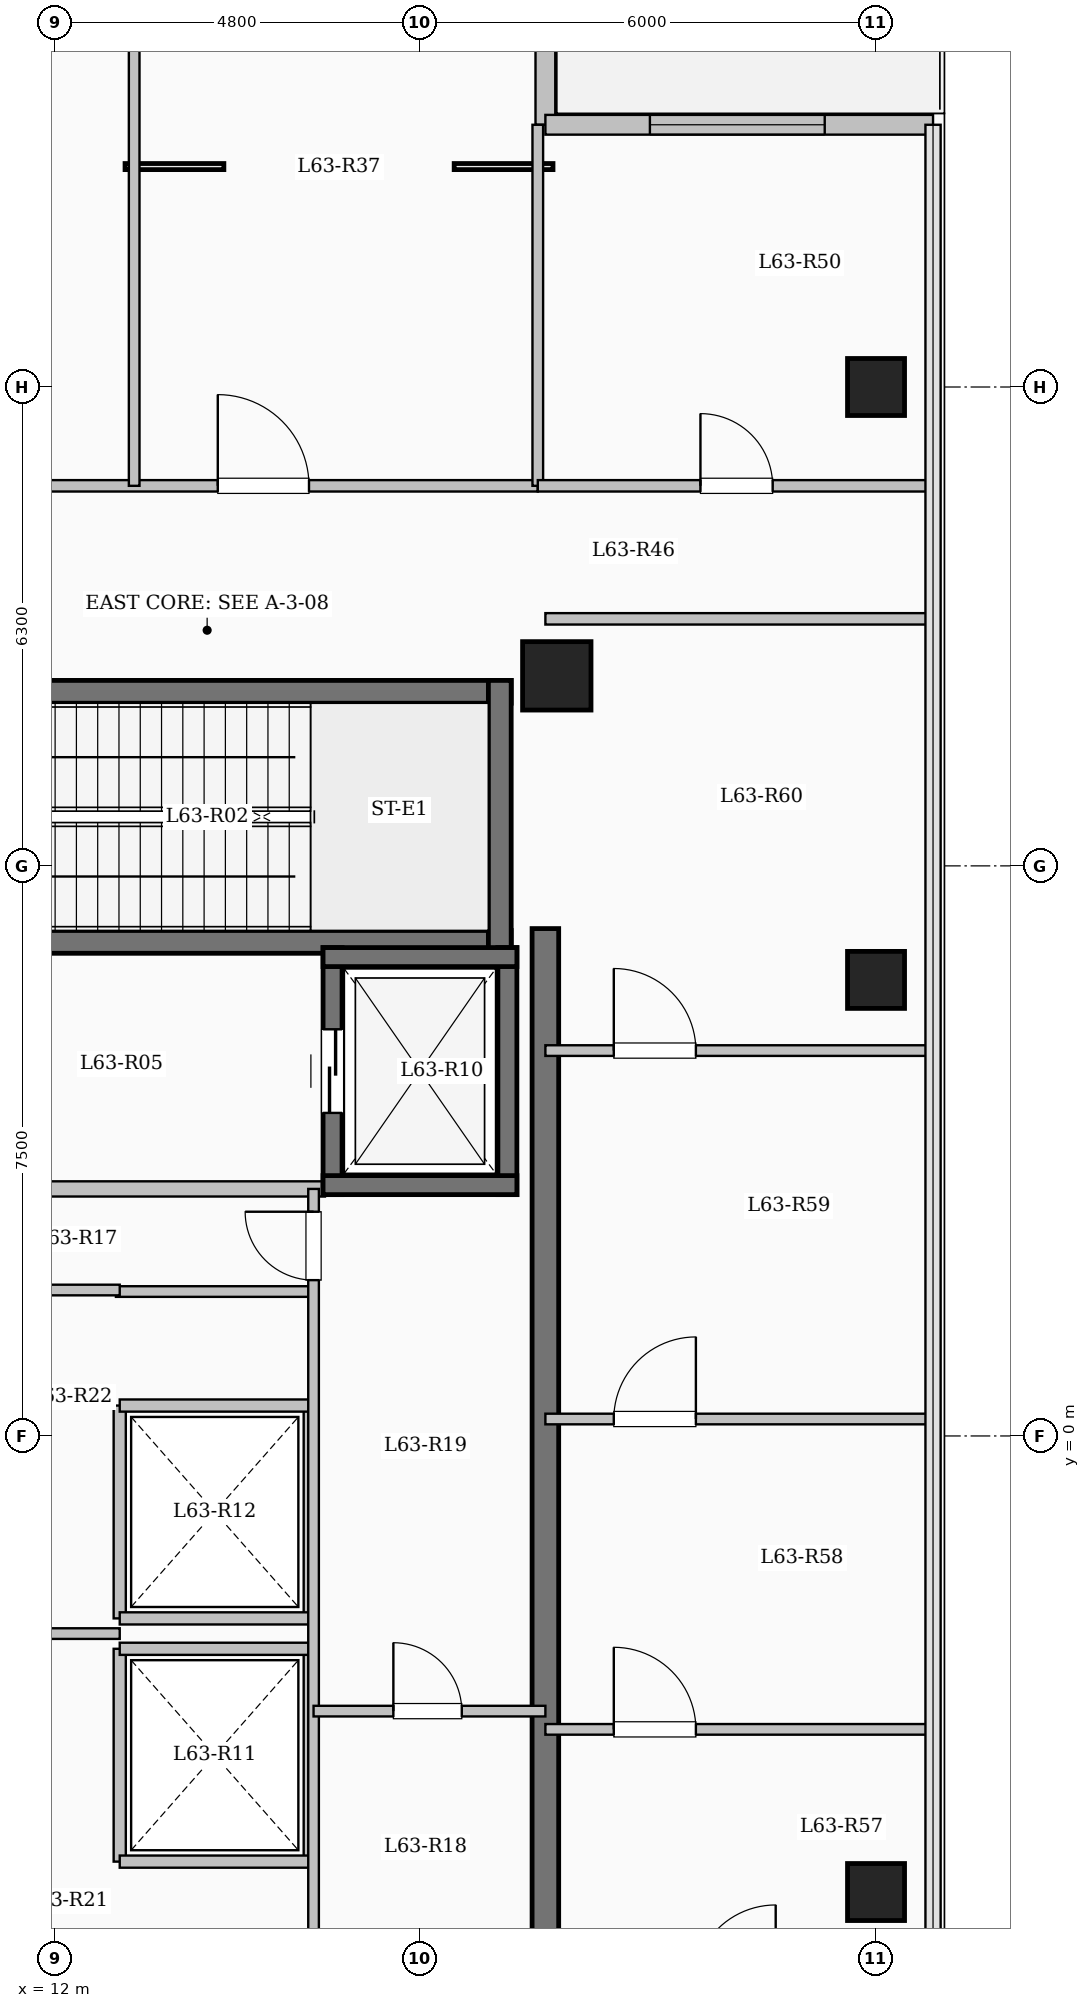
"""IFC4 building model, lengths in metres.
Left out: names, types, materials, properties, quantities, classifications, styles, units other than length and angle.
Written with IfcOpenShell. Run it as: python <this file> out.ifc"""

import sys

from ifc_helpers import new_model, si_unit, direction, frame, frame_2d, origin, origin_2d, place, context, subcontext, project, spatial, rectangle, extrude, element, fill, save


model = new_model("IFC4")
c1 = context("Model", 3, precision=1e-05, world=origin(), true_north=direction((0.0, 1.0)))
c2 = subcontext(c1, "Body", "Model", "MODEL_VIEW")
j1 = project(units=[si_unit("LENGTHUNIT", "METRE"), si_unit("PLANEANGLEUNIT", "RADIAN")], contexts=[c1])
p1 = place(None, origin())
s1 = spatial("IfcSite", under=j1, at=p1, CompositionType="ELEMENT")
p2 = place(p1, origin())
s2 = spatial("IfcBuilding", under=s1, at=p2, CompositionType="ELEMENT")
p3 = place(p2, frame((0.0, 0.0, 231.75)))
s3 = spatial("IfcBuildingStorey", under=s2, at=p3, CompositionType="ELEMENT", Elevation=231.75)
p4 = place(p3, frame((18.6, 10.0, 0.0), z_axis=(0.0, 0.0, 1.0), x_axis=(1.0, 0.0, 0.0)))
e1 = element("IfcColumn", 1, at=p4, inside=s3, PredefinedType="COLUMN", context=c2, shape_type="SweptSolid", body=[
    extrude(rectangle(XDim=0.9, YDim=0.9, at=origin_2d()), origin(), (0.0, 0.0, 1.0), 4.65),
])
for number, where, z_axis, x_axis in (
    (2, (22.8, -6.0, 0.0), (0.0, 0.0, 1.0), (1.0, 0.0, 0.0)),
    (3, (22.8, 6.0, 0.0), (0.0, 0.0, 1.0), (1.0, 0.0, 0.0)),
    (4, (22.8, 13.8, 0.0), (0.0, 0.0, 1.0), (1.0, 0.0, 0.0)),
):
    element("IfcColumn", number, at=place(p3, frame(where, z_axis=z_axis, x_axis=x_axis)), inside=s3, PredefinedType="COLUMN", context=c2, shape_type="SweptSolid", body=[
        extrude(rectangle(XDim=0.75, YDim=0.75, at=origin_2d()), origin(), (0.0, 0.0, 1.0), 4.65),
    ])
p5 = place(p3, frame((18.45, 20.85, 0.0), z_axis=(0.0, 0.0, 1.0), x_axis=(0.0, -1.0, 0.0)))
e5 = element("IfcWall", 5, at=p5, inside=s3, PredefinedType="SOLIDWALL", context=c2, shape_type="SweptSolid", body=[
    extrude(rectangle(XDim=3.6, YDim=0.26, at=frame_2d((1.8, 0.0))), origin(), (0.0, 0.0, 1.0), 4.35),
])
p6 = place(p5, frame((1.25, 0.0, 0.0)))
e6 = element("IfcOpeningElement", 6, at=p6, cuts=e5, PredefinedType="OPENING", context=c2, shape_type="SweptSolid", body=[
    extrude(rectangle(XDim=1.1, YDim=2.2, at=frame_2d((0.55, 1.1))), frame((0.0, 0.14, 0.0), z_axis=(0.0, -1.0, 0.0), x_axis=(1.0, 0.0, 0.0)), (0.0, 0.0, 1.0), 0.28),
])
p7 = place(p3, frame((18.45, 17.25, 0.0), z_axis=(0.0, 0.0, 1.0), x_axis=(1.0, 0.0, 0.0)))
e7 = element("IfcWall", 7, at=p7, inside=s3, PredefinedType="SOLIDWALL", context=c2, shape_type="SweptSolid", body=[
    extrude(rectangle(XDim=5.1, YDim=0.26, at=frame_2d((2.55, 0.0))), origin(), (0.0, 0.0, 1.0), 4.35),
])
p8 = place(p7, frame((1.375, 0.0, 0.85)))
e8 = element("IfcOpeningElement", 8, at=p8, cuts=e7, PredefinedType="OPENING", context=c2, shape_type="SweptSolid", body=[
    extrude(rectangle(XDim=2.3, YDim=2.2, at=frame_2d((1.15, 1.1))), frame((0.0, 0.14, 0.0), z_axis=(0.0, -1.0, 0.0), x_axis=(1.0, 0.0, 0.0)), (0.0, 0.0, 1.0), 0.28),
])
p9 = place(p3, frame((10.0, 9.79, 0.0), z_axis=(0.0, 0.0, 1.0), x_axis=(1.0, 0.0, 0.0)))
e9 = element("IfcWall", 9, at=p9, inside=s3, PredefinedType="SHEAR", context=c2, shape_type="SweptSolid", body=[
    extrude(rectangle(XDim=8.0, YDim=0.3, at=frame_2d((4.0, 0.0))), origin(), (0.0, 0.0, 1.0), 4.65),
])
p10 = place(p3, frame((10.0, 6.5, 0.0), z_axis=(0.0, 0.0, 1.0), x_axis=(1.0, 0.0, 0.0)))
e10 = element("IfcWall", 10, at=p10, inside=s3, PredefinedType="SHEAR", context=c2, shape_type="SweptSolid", body=[
    extrude(rectangle(XDim=8.0, YDim=0.3, at=frame_2d((4.0, 0.0))), origin(), (0.0, 0.0, 1.0), 4.65),
])
p11 = place(p10, frame((0.55, 0.0, 0.0)))
e11 = element("IfcOpeningElement", 11, at=p11, cuts=e10, PredefinedType="OPENING", context=c2, shape_type="SweptSolid", body=[
    extrude(rectangle(XDim=1.0, YDim=2.15, at=frame_2d((0.5, 1.075))), frame((0.0, 0.16, 0.0), z_axis=(0.0, -1.0, 0.0), x_axis=(1.0, 0.0, 0.0)), (0.0, 0.0, 1.0), 0.32),
])
p12 = place(p3, frame((17.85, 6.35, 0.0), z_axis=(0.0, 0.0, 1.0), x_axis=(0.0, 1.0, 0.0)))
e12 = element("IfcWall", 12, at=p12, inside=s3, PredefinedType="SHEAR", context=c2, shape_type="SweptSolid", body=[
    extrude(rectangle(XDim=3.59, YDim=0.3, at=frame_2d((1.795, 0.0))), origin(), (0.0, 0.0, 1.0), 4.65),
])
p13 = place(p3, frame((10.15, 3.25, 0.0), z_axis=(0.0, 0.0, 1.0), x_axis=(1.0, 0.0, 0.0)))
e13 = element("IfcWall", 13, at=p13, inside=s3, PredefinedType="SOLIDWALL", context=c2, shape_type="SweptSolid", body=[
    extrude(rectangle(XDim=5.4, YDim=0.2, at=frame_2d((2.7, 0.0))), origin(), (0.0, 0.0, 1.0), 4.35),
])
p14 = place(p3, frame((15.65, 3.175, 0.0), z_axis=(0.0, 0.0, 1.0), x_axis=(0.0, 1.0, 0.0)))
e14 = element("IfcWall", 14, at=p14, inside=s3, PredefinedType="SHEAR", context=c2, shape_type="SweptSolid", body=[
    extrude(rectangle(XDim=3.25, YDim=0.25, at=frame_2d((1.625, 0.0))), origin(), (0.0, 0.0, 1.0), 4.65),
])
p15 = place(p14, frame((1.075, 0.0, 0.0)))
e15 = element("IfcOpeningElement", 15, at=p15, cuts=e14, PredefinedType="OPENING", context=c2, shape_type="SweptSolid", body=[
    extrude(rectangle(XDim=1.1, YDim=2.15, at=frame_2d((0.55, 1.075))), frame((0.0, 0.135, 0.0), z_axis=(0.0, -1.0, 0.0), x_axis=(1.0, 0.0, 0.0)), (0.0, 0.0, 1.0), 0.27),
])
p16 = place(p3, frame((17.95, 3.175, 0.0), z_axis=(0.0, 0.0, 1.0), x_axis=(0.0, 1.0, 0.0)))
e16 = element("IfcWall", 16, at=p16, inside=s3, PredefinedType="SHEAR", context=c2, shape_type="SweptSolid", body=[
    extrude(rectangle(XDim=3.25, YDim=0.25, at=frame_2d((1.625, 0.0))), origin(), (0.0, 0.0, 1.0), 4.65),
])
for number, where, z_axis, x_axis in (
    (17, (15.525, 3.3, 0.0), (0.0, 0.0, 1.0), (1.0, 0.0, 0.0)),
    (18, (15.525, 6.3, 0.0), (0.0, 0.0, 1.0), (1.0, 0.0, 0.0)),
):
    element("IfcWall", number, at=place(p3, frame(where, z_axis=z_axis, x_axis=x_axis)), inside=s3, PredefinedType="SHEAR", context=c2, shape_type="SweptSolid", body=[
        extrude(rectangle(XDim=2.55, YDim=0.25, at=frame_2d((1.275, 0.0))), origin(), (0.0, 0.0, 1.0), 4.65),
    ])
for number, where, z_axis, x_axis in (
    (19, (12.85, -5.6, 0.0), (0.0, 0.0, 1.0), (0.0, 1.0, 0.0)),
    (20, (15.35, -5.6, 0.0), (0.0, 0.0, 1.0), (0.0, 1.0, 0.0)),
):
    element("IfcWall", number, at=place(p3, frame(where, z_axis=z_axis, x_axis=x_axis)), inside=s3, PredefinedType="SOLIDWALL", context=c2, shape_type="SweptSolid", body=[
        extrude(rectangle(XDim=2.8, YDim=0.16, at=frame_2d((1.4, 0.0))), origin(), (0.0, 0.0, 1.0), 4.35),
    ])
for number, where, z_axis, x_axis in (
    (21, (12.85, -5.6, 0.0), (0.0, 0.0, 1.0), (1.0, 0.0, 0.0)),
    (22, (12.85, -2.8, 0.0), (0.0, 0.0, 1.0), (1.0, 0.0, 0.0)),
):
    element("IfcWall", number, at=place(p3, frame(where, z_axis=z_axis, x_axis=x_axis)), inside=s3, PredefinedType="SOLIDWALL", context=c2, shape_type="SweptSolid", body=[
        extrude(rectangle(XDim=2.5, YDim=0.16, at=frame_2d((1.25, 0.0))), origin(), (0.0, 0.0, 1.0), 4.35),
    ])
for number, where, z_axis, x_axis in (
    (23, (12.85, -2.4, 0.0), (0.0, 0.0, 1.0), (0.0, 1.0, 0.0)),
    (24, (15.35, -2.4, 0.0), (0.0, 0.0, 1.0), (0.0, 1.0, 0.0)),
):
    element("IfcWall", number, at=place(p3, frame(where, z_axis=z_axis, x_axis=x_axis)), inside=s3, PredefinedType="SOLIDWALL", context=c2, shape_type="SweptSolid", body=[
        extrude(rectangle(XDim=2.8, YDim=0.16, at=frame_2d((1.4, 0.0))), origin(), (0.0, 0.0, 1.0), 4.35),
    ])
for number, where, z_axis, x_axis in (
    (25, (12.85, -2.4, 0.0), (0.0, 0.0, 1.0), (1.0, 0.0, 0.0)),
    (26, (12.85, 0.4, 0.0), (0.0, 0.0, 1.0), (1.0, 0.0, 0.0)),
):
    element("IfcWall", number, at=place(p3, frame(where, z_axis=z_axis, x_axis=x_axis)), inside=s3, PredefinedType="SOLIDWALL", context=c2, shape_type="SweptSolid", body=[
        extrude(rectangle(XDim=2.5, YDim=0.16, at=frame_2d((1.25, 0.0))), origin(), (0.0, 0.0, 1.0), 4.35),
    ])
p17 = place(p3, frame((18.45, -7.375, 0.0), z_axis=(0.0, 0.0, 1.0), x_axis=(0.0, 1.0, 0.0)))
e27 = element("IfcWall", 27, at=p17, inside=s3, PredefinedType="SHEAR", context=c2, shape_type="SweptSolid", body=[
    extrude(rectangle(XDim=14.05, YDim=0.35, at=frame_2d((7.025, 0.0))), origin(), (0.0, 0.0, 1.0), 4.65),
])
p18 = place(p3, frame((12.8, 1.9, 0.0), z_axis=(0.0, 0.0, 1.0), x_axis=(1.0, 0.0, 0.0)))
e28 = element("IfcWall", 28, at=p18, inside=s3, PredefinedType="PARTITIONING", context=c2, shape_type="SweptSolid", body=[
    extrude(rectangle(XDim=2.6, YDim=0.14, at=frame_2d((1.3, 0.0))), origin(), (0.0, 0.0, 1.0), 4.35),
])
p19 = place(p3, frame((15.4, -7.2, 0.0), z_axis=(0.0, 0.0, 1.0), x_axis=(0.0, 1.0, 0.0)))
e29 = element("IfcWall", 29, at=p19, inside=s3, PredefinedType="PARTITIONING", context=c2, shape_type="SweptSolid", body=[
    extrude(rectangle(XDim=10.45, YDim=0.14, at=frame_2d((5.225, 0.0))), origin(), (0.0, 0.0, 1.0), 4.35),
])
p20 = place(p19, frame((9.25, 0.0, 0.0)))
e30 = element("IfcOpeningElement", 30, at=p20, cuts=e29, PredefinedType="OPENING", context=c2, shape_type="SweptSolid", body=[
    extrude(rectangle(XDim=0.9, YDim=2.08, at=frame_2d((0.45, 1.04))), frame((0.0, 0.08, 0.0), z_axis=(0.0, -1.0, 0.0), x_axis=(1.0, 0.0, 0.0)), (0.0, 0.0, 1.0), 0.16),
])
p21 = place(p3, frame((15.4, -3.62, 0.0), z_axis=(0.0, 0.0, 1.0), x_axis=(1.0, 0.0, 0.0)))
e31 = element("IfcWall", 31, at=p21, inside=s3, PredefinedType="PARTITIONING", context=c2, shape_type="SweptSolid", body=[
    extrude(rectangle(XDim=3.05, YDim=0.14, at=frame_2d((1.525, 0.0))), origin(), (0.0, 0.0, 1.0), 4.35),
])
p22 = place(p21, frame((1.05, 0.0, 0.0)))
e32 = element("IfcOpeningElement", 32, at=p22, cuts=e31, PredefinedType="OPENING", context=c2, shape_type="SweptSolid", body=[
    extrude(rectangle(XDim=0.9, YDim=2.08, at=frame_2d((0.45, 1.04))), frame((0.0, 0.08, 0.0), z_axis=(0.0, -1.0, 0.0), x_axis=(1.0, 0.0, 0.0)), (0.0, 0.0, 1.0), 0.16),
])
for number, where, z_axis, x_axis in (
    (33, (11.52, 1.92, 0.0), (0.0, 0.0, 1.0), (1.0, 0.0, 0.0)),
    (34, (11.52, -2.6, 0.0), (0.0, 0.0, 1.0), (1.0, 0.0, 0.0)),
):
    element("IfcWall", number, at=place(p3, frame(where, z_axis=z_axis, x_axis=x_axis)), inside=s3, PredefinedType="PARTITIONING", context=c2, shape_type="SweptSolid", body=[
        extrude(rectangle(XDim=1.33, YDim=0.14, at=frame_2d((0.665, 0.0))), origin(), (0.0, 0.0, 1.0), 4.35),
    ])
p23 = place(p3, frame((3.85, 12.5, 0.0), z_axis=(0.0, 0.0, 1.0), x_axis=(1.0, 0.0, 0.0)))
e35 = element("IfcWall", 35, at=p23, inside=s3, PredefinedType="PARTITIONING", context=c2, shape_type="SweptSolid", body=[
    extrude(rectangle(XDim=14.5, YDim=0.15, at=frame_2d((7.25, 0.0))), origin(), (0.0, 0.0, 1.0), 4.35),
])
p24 = place(p23, frame((0.8, 0.0, 0.0)))
e36 = element("IfcOpeningElement", 36, at=p24, cuts=e35, PredefinedType="OPENING", context=c2, shape_type="SweptSolid", body=[
    extrude(rectangle(XDim=0.95, YDim=2.15, at=frame_2d((0.475, 1.075))), frame((0.0, 0.085, 0.0), z_axis=(0.0, -1.0, 0.0), x_axis=(1.0, 0.0, 0.0)), (0.0, 0.0, 1.0), 0.17),
])
p25 = place(p23, frame((3.6, 0.0, 0.0)))
e37 = element("IfcOpeningElement", 37, at=p25, cuts=e35, PredefinedType="OPENING", context=c2, shape_type="SweptSolid", body=[
    extrude(rectangle(XDim=0.95, YDim=2.15, at=frame_2d((0.475, 1.075))), frame((0.0, 0.085, 0.0), z_axis=(0.0, -1.0, 0.0), x_axis=(1.0, 0.0, 0.0)), (0.0, 0.0, 1.0), 0.17),
])
p26 = place(p23, frame((6.55, 0.0, 0.0)))
e38 = element("IfcOpeningElement", 38, at=p26, cuts=e35, PredefinedType="OPENING", context=c2, shape_type="SweptSolid", body=[
    extrude(rectangle(XDim=1.08, YDim=2.15, at=frame_2d((0.54, 1.075))), frame((0.0, 0.085, 0.0), z_axis=(0.0, -1.0, 0.0), x_axis=(1.0, 0.0, 0.0)), (0.0, 0.0, 1.0), 0.17),
])
p27 = place(p23, frame((10.29, 0.0, 0.0)))
e39 = element("IfcOpeningElement", 39, at=p27, cuts=e35, PredefinedType="OPENING", context=c2, shape_type="SweptSolid", body=[
    extrude(rectangle(XDim=1.2, YDim=2.15, at=frame_2d((0.6, 1.075))), frame((0.0, 0.085, 0.0), z_axis=(0.0, -1.0, 0.0), x_axis=(1.0, 0.0, 0.0)), (0.0, 0.0, 1.0), 0.17),
])
p28 = place(p3, frame((13.04, 12.5, 0.0), z_axis=(0.0, 0.0, 1.0), x_axis=(0.0, 1.0, 0.0)))
e40 = element("IfcWall", 40, at=p28, inside=s3, PredefinedType="PARTITIONING", context=c2, shape_type="SweptSolid", body=[
    extrude(rectangle(XDim=8.4, YDim=0.14, at=frame_2d((4.2, 0.0))), origin(), (0.0, 0.0, 1.0), 4.35),
])
p29 = place(p3, frame((18.45, 10.75, 0.0), z_axis=(0.0, 0.0, 1.0), x_axis=(1.0, 0.0, 0.0)))
e41 = element("IfcWall", 41, at=p29, inside=s3, PredefinedType="PARTITIONING", context=c2, shape_type="SweptSolid", body=[
    extrude(rectangle(XDim=5.13, YDim=0.15, at=frame_2d((2.565, 0.0))), origin(), (0.0, 0.0, 1.0), 4.35),
])
p30 = place(p3, frame((18.35, 12.5, 0.0), z_axis=(0.0, 0.0, 1.0), x_axis=(0.0, 1.0, 0.0)))
e42 = element("IfcWall", 42, at=p30, inside=s3, PredefinedType="PARTITIONING", context=c2, shape_type="SweptSolid", body=[
    extrude(rectangle(XDim=4.75, YDim=0.14, at=frame_2d((2.375, 0.0))), origin(), (0.0, 0.0, 1.0), 4.35),
])
p31 = place(p3, frame((18.35, 12.5, 0.0), z_axis=(0.0, 0.0, 1.0), x_axis=(1.0, 0.0, 0.0)))
e43 = element("IfcWall", 43, at=p31, inside=s3, PredefinedType="PARTITIONING", context=c2, shape_type="SweptSolid", body=[
    extrude(rectangle(XDim=5.23, YDim=0.15, at=frame_2d((2.615, 0.0))), origin(), (0.0, 0.0, 1.0), 4.35),
])
p32 = place(p31, frame((2.14, 0.0, 0.0)))
e44 = element("IfcOpeningElement", 44, at=p32, cuts=e43, PredefinedType="OPENING", context=c2, shape_type="SweptSolid", body=[
    extrude(rectangle(XDim=0.95, YDim=2.15, at=frame_2d((0.475, 1.075))), frame((0.0, 0.085, 0.0), z_axis=(0.0, -1.0, 0.0), x_axis=(1.0, 0.0, 0.0)), (0.0, 0.0, 1.0), 0.17),
])
p33 = place(p3, frame((18.45, -3.86, 0.0), z_axis=(0.0, 0.0, 1.0), x_axis=(1.0, 0.0, 0.0)))
e45 = element("IfcWall", 45, at=p33, inside=s3, PredefinedType="PARTITIONING", context=c2, shape_type="SweptSolid", body=[
    extrude(rectangle(XDim=5.13, YDim=0.14, at=frame_2d((2.565, 0.0))), origin(), (0.0, 0.0, 1.0), 4.35),
])
p34 = place(p33, frame((0.9, 0.0, 0.0)))
e46 = element("IfcOpeningElement", 46, at=p34, cuts=e45, PredefinedType="OPENING", context=c2, shape_type="SweptSolid", body=[
    extrude(rectangle(XDim=1.08, YDim=2.15, at=frame_2d((0.54, 1.075))), frame((0.0, 0.08, 0.0), z_axis=(0.0, -1.0, 0.0), x_axis=(1.0, 0.0, 0.0)), (0.0, 0.0, 1.0), 0.16),
])
p35 = place(p3, frame((18.45, 0.223, 0.0), z_axis=(0.0, 0.0, 1.0), x_axis=(1.0, 0.0, 0.0)))
e47 = element("IfcWall", 47, at=p35, inside=s3, PredefinedType="PARTITIONING", context=c2, shape_type="SweptSolid", body=[
    extrude(rectangle(XDim=5.13, YDim=0.14, at=frame_2d((2.565, 0.0))), origin(), (0.0, 0.0, 1.0), 4.35),
])
p36 = place(p35, frame((0.9, 0.0, 0.0)))
e48 = element("IfcOpeningElement", 48, at=p36, cuts=e47, PredefinedType="OPENING", context=c2, shape_type="SweptSolid", body=[
    extrude(rectangle(XDim=1.08, YDim=2.15, at=frame_2d((0.54, 1.075))), frame((0.0, 0.08, 0.0), z_axis=(0.0, -1.0, 0.0), x_axis=(1.0, 0.0, 0.0)), (0.0, 0.0, 1.0), 0.16),
])
p37 = place(p3, frame((18.45, 5.07, 0.0), z_axis=(0.0, 0.0, 1.0), x_axis=(1.0, 0.0, 0.0)))
e49 = element("IfcWall", 49, at=p37, inside=s3, PredefinedType="PARTITIONING", context=c2, shape_type="SweptSolid", body=[
    extrude(rectangle(XDim=5.13, YDim=0.14, at=frame_2d((2.565, 0.0))), origin(), (0.0, 0.0, 1.0), 4.35),
])
p38 = place(p37, frame((0.9, 0.0, 0.0)))
e50 = element("IfcOpeningElement", 50, at=p38, cuts=e49, PredefinedType="OPENING", context=c2, shape_type="SweptSolid", body=[
    extrude(rectangle(XDim=1.08, YDim=2.15, at=frame_2d((0.54, 1.075))), frame((0.0, 0.08, 0.0), z_axis=(0.0, -1.0, 0.0), x_axis=(1.0, 0.0, 0.0)), (0.0, 0.0, 1.0), 0.16),
])
p39 = place(p8, origin())
e51 = element("IfcWindow", 51, at=p39, inside=s3, PartitioningType="SINGLE_PANEL", PredefinedType="WINDOW", context=c2, shape_type="SweptSolid", body=[
    extrude(rectangle(XDim=2.3, YDim=2.2, at=frame_2d((1.15, 1.1))), frame((0.0, 0.03, 0.0), z_axis=(0.0, -1.0, 0.0), x_axis=(1.0, 0.0, 0.0)), (0.0, 0.0, 1.0), 0.06),
])
fill(e8, e51)
p40 = place(p15, origin())
e52 = element("IfcDoor", 52, at=p40, inside=s3, OperationType="SLIDING_TO_LEFT", PredefinedType="DOOR", context=c2, shape_type="SweptSolid", body=[
    extrude(rectangle(XDim=1.1, YDim=2.15, at=frame_2d((0.55, 1.075))), frame((0.0, 0.025, 0.0), z_axis=(0.0, -1.0, 0.0), x_axis=(1.0, 0.0, 0.0)), (0.0, 0.0, 1.0), 0.05),
])
fill(e15, e52)
p41 = place(p20, origin())
e53 = element("IfcDoor", 53, at=p41, inside=s3, OperationType="SINGLE_SWING_RIGHT", PredefinedType="DOOR", context=c2, shape_type="SweptSolid", body=[
    extrude(rectangle(XDim=0.9, YDim=2.08, at=frame_2d((0.45, 1.04))), frame((0.0, 0.025, 0.0), z_axis=(0.0, -1.0, 0.0), x_axis=(1.0, 0.0, 0.0)), (0.0, 0.0, 1.0), 0.05),
])
fill(e30, e53)
p42 = place(p22, origin())
e54 = element("IfcDoor", 54, at=p42, inside=s3, OperationType="SINGLE_SWING_LEFT", PredefinedType="DOOR", context=c2, shape_type="SweptSolid", body=[
    extrude(rectangle(XDim=0.9, YDim=2.08, at=frame_2d((0.45, 1.04))), frame((0.0, 0.025, 0.0), z_axis=(0.0, -1.0, 0.0), x_axis=(1.0, 0.0, 0.0)), (0.0, 0.0, 1.0), 0.05),
])
fill(e32, e54)
p43 = place(p27, origin())
e55 = element("IfcDoor", 55, at=p43, inside=s3, OperationType="SINGLE_SWING_LEFT", PredefinedType="DOOR", context=c2, shape_type="SweptSolid", body=[
    extrude(rectangle(XDim=1.2, YDim=2.15, at=frame_2d((0.6, 1.075))), frame((0.0, 0.025, 0.0), z_axis=(0.0, -1.0, 0.0), x_axis=(1.0, 0.0, 0.0)), (0.0, 0.0, 1.0), 0.05),
])
fill(e39, e55)
p44 = place(p32, origin())
e56 = element("IfcDoor", 56, at=p44, inside=s3, OperationType="SINGLE_SWING_LEFT", PredefinedType="DOOR", context=c2, shape_type="SweptSolid", body=[
    extrude(rectangle(XDim=0.95, YDim=2.15, at=frame_2d((0.475, 1.075))), frame((0.0, 0.025, 0.0), z_axis=(0.0, -1.0, 0.0), x_axis=(1.0, 0.0, 0.0)), (0.0, 0.0, 1.0), 0.05),
])
fill(e44, e56)
p45 = place(p34, origin())
e57 = element("IfcDoor", 57, at=p45, inside=s3, OperationType="SINGLE_SWING_LEFT", PredefinedType="DOOR", context=c2, shape_type="SweptSolid", body=[
    extrude(rectangle(XDim=1.08, YDim=2.15, at=frame_2d((0.54, 1.075))), frame((0.0, 0.025, 0.0), z_axis=(0.0, -1.0, 0.0), x_axis=(1.0, 0.0, 0.0)), (0.0, 0.0, 1.0), 0.05),
])
fill(e46, e57)
p46 = place(p36, origin())
e58 = element("IfcDoor", 58, at=p46, inside=s3, OperationType="SINGLE_SWING_RIGHT", PredefinedType="DOOR", context=c2, shape_type="SweptSolid", body=[
    extrude(rectangle(XDim=1.08, YDim=2.15, at=frame_2d((0.54, 1.075))), frame((0.0, 0.025, 0.0), z_axis=(0.0, -1.0, 0.0), x_axis=(1.0, 0.0, 0.0)), (0.0, 0.0, 1.0), 0.05),
])
fill(e48, e58)
p47 = place(p38, origin())
e59 = element("IfcDoor", 59, at=p47, inside=s3, OperationType="SINGLE_SWING_LEFT", PredefinedType="DOOR", context=c2, shape_type="SweptSolid", body=[
    extrude(rectangle(XDim=1.08, YDim=2.15, at=frame_2d((0.54, 1.075))), frame((0.0, 0.025, 0.0), z_axis=(0.0, -1.0, 0.0), x_axis=(1.0, 0.0, 0.0)), (0.0, 0.0, 1.0), 0.05),
])
fill(e50, e59)
save(model, sys.argv[1])
